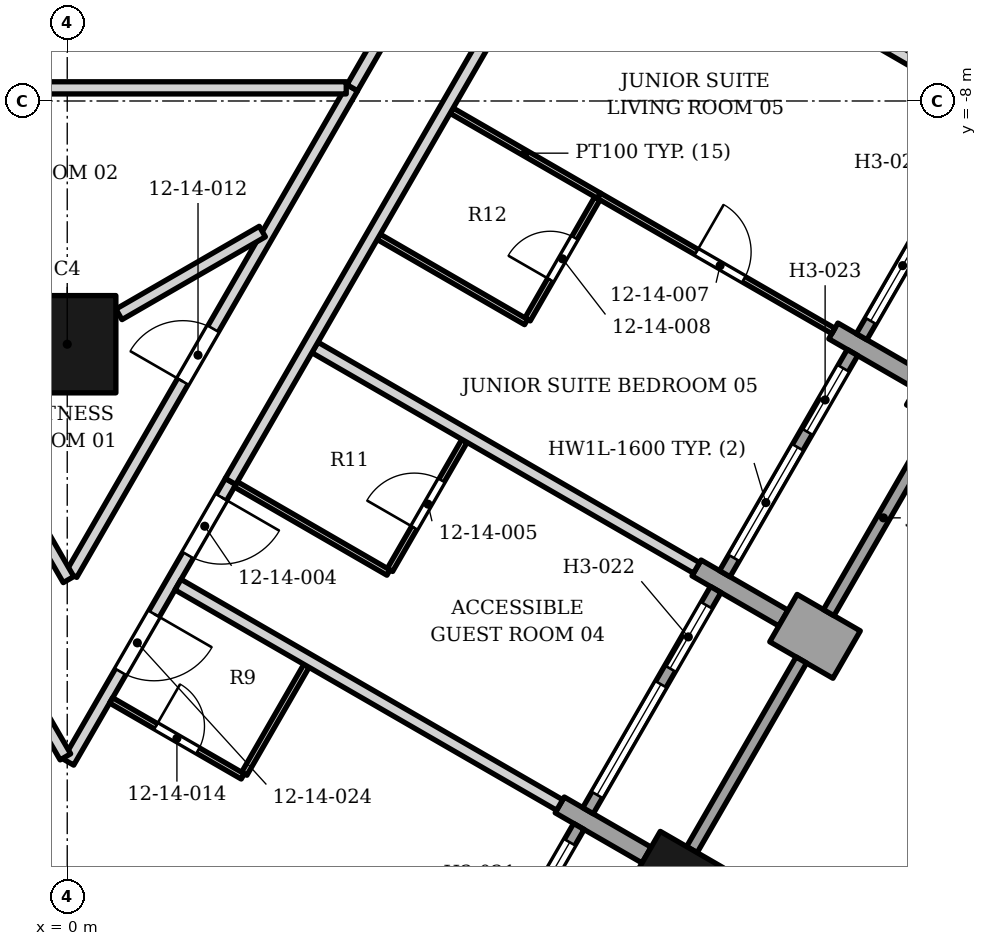
"""IFC4 building model, lengths in metres.
Left out: names, types, materials, properties, quantities, classifications, styles, units other than length and angle.
Written with IfcOpenShell. Run it as: python <this file> out.ifc"""

import sys

from ifc_helpers import new_model, si_unit, direction, frame, frame_2d, origin, origin_2d, place, context, subcontext, project, spatial, rectangle, extrude, element, fill, save


model = new_model("IFC4")
c1 = context("Model", 3, precision=1e-05, world=origin(), true_north=direction((0.0, 1.0)))
c2 = subcontext(c1, "Body", "Model", "MODEL_VIEW")
j1 = project(units=[si_unit("LENGTHUNIT", "METRE"), si_unit("PLANEANGLEUNIT", "RADIAN")], contexts=[c1])
p1 = place(None, origin())
s1 = spatial("IfcSite", under=j1, at=p1, CompositionType="ELEMENT")
p2 = place(p1, origin())
s2 = spatial("IfcBuilding", under=s1, at=p2, CompositionType="ELEMENT")
p3 = place(p2, frame((0.0, 0.0, 66.4)))
s3 = spatial("IfcBuildingStorey", under=s2, at=p3, CompositionType="ELEMENT", Elevation=66.4)
p4 = place(p3, frame((0.0, -12.0, 0.0), z_axis=(0.0, 0.0, 1.0), x_axis=(1.0, 0.0, 0.0)))
e1 = element("IfcColumn", 1, at=p4, inside=s3, PredefinedType="COLUMN", context=c2, shape_type="SweptSolid", body=[
    extrude(rectangle(XDim=1.6, YDim=1.6, at=origin_2d()), origin(), (0.0, 0.0, 1.0), 3.4),
])
for number, where, z_axis, x_axis in (
    (2, (10.048, -20.701, 0.0), (0.0, 0.0, 1.0), (0.5, 0.866, 0.0)),
    (3, (14.548, -12.907, 0.0), (0.0, 0.0, 1.0), (0.5, 0.866, 0.0)),
):
    element("IfcColumn", number, at=place(p3, frame(where, z_axis=z_axis, x_axis=x_axis)), inside=s3, PredefinedType="COLUMN", context=c2, shape_type="SweptSolid", body=[
        extrude(rectangle(XDim=0.9, YDim=1.2, at=origin_2d()), origin(), (0.0, 0.0, 1.0), 3.4),
    ])
p5 = place(p3, frame((9.529, -20.401, 0.0), z_axis=(0.0, 0.0, 1.0), x_axis=(-0.866003217194, 0.500038426333, 0.0)))
e4 = element("IfcWall", 4, at=p5, inside=s3, PredefinedType="SOLIDWALL", context=c2, shape_type="SweptSolid", body=[
    extrude(rectangle(XDim=1.65, YDim=0.3, at=frame_2d((0.825, 0.0))), origin(), (0.0, 0.0, 1.0), 2.65),
])
p6 = place(p3, frame((12.818, -17.104, 0.0), z_axis=(0.0, 0.0, 1.0), x_axis=(-0.866043267704, 0.499969057507, 0.0)))
e5 = element("IfcWall", 5, at=p6, inside=s3, PredefinedType="SOLIDWALL", context=c2, shape_type="SweptSolid", body=[
    extrude(rectangle(XDim=1.2, YDim=0.9, at=frame_2d((0.6, 0.0))), origin(), (0.0, 0.0, 1.0), 2.63),
])
p7 = place(p3, frame((11.779, -16.504, 0.0), z_axis=(0.0, 0.0, 1.0), x_axis=(-0.865976140824, 0.500085316245, 0.0)))
e6 = element("IfcWall", 6, at=p7, inside=s3, PredefinedType="SOLIDWALL", context=c2, shape_type="SweptSolid", body=[
    extrude(rectangle(XDim=1.65, YDim=0.3, at=frame_2d((0.825, 0.0))), origin(), (0.0, 0.0, 1.0), 2.65),
])
p8 = place(p3, frame((14.029, -12.607, 0.0), z_axis=(0.0, 0.0, 1.0), x_axis=(-0.866003217194, 0.500038426333, 0.0)))
e7 = element("IfcWall", 7, at=p8, inside=s3, PredefinedType="SOLIDWALL", context=c2, shape_type="SweptSolid", body=[
    extrude(rectangle(XDim=1.65, YDim=0.3, at=frame_2d((0.825, 0.0))), origin(), (0.0, 0.0, 1.0), 2.302),
])
p9 = place(p3, frame((6.314, -23.568, 0.0), z_axis=(0.0, 0.0, 1.0), x_axis=(0.500027713859, 0.866009402589, 0.0)))
e8 = element("IfcWall", 8, at=p9, inside=s3, PredefinedType="ELEMENTEDWALL", context=c2, shape_type="SweptSolid", body=[
    extrude(rectangle(XDim=4.2, YDim=0.2, at=frame_2d((2.1, 0.0))), origin(), (0.0, 0.0, 1.0), 2.65),
])
p10 = place(p9, frame((0.3, 0.0, 0.6)))
e9 = element("IfcOpeningElement", 9, at=p10, cuts=e8, PredefinedType="OPENING", context=c2, shape_type="SweptSolid", body=[
    extrude(rectangle(XDim=2.1, YDim=1.8, at=frame_2d((1.05, 0.9))), frame((0.0, 0.11, 0.0), z_axis=(0.0, -1.0, 0.0), x_axis=(1.0, 0.0, 0.0)), (0.0, 0.0, 1.0), 0.22),
])
p11 = place(p9, frame((2.7, 0.0, 0.0)))
e10 = element("IfcOpeningElement", 10, at=p11, cuts=e8, PredefinedType="OPENING", context=c2, shape_type="SweptSolid", body=[
    extrude(rectangle(XDim=1.2, YDim=2.4, at=frame_2d((0.6, 1.2))), frame((0.0, 0.11, 0.0), z_axis=(0.0, -1.0, 0.0), x_axis=(1.0, 0.0, 0.0)), (0.0, 0.0, 1.0), 0.22),
])
p12 = place(p3, frame((10.273, -20.311, 0.0), z_axis=(0.0, 0.0, 1.0), x_axis=(0.499961193289, 0.866047807691, 0.0)))
e11 = element("IfcWall", 11, at=p12, inside=s3, PredefinedType="SOLIDWALL", context=c2, shape_type="SweptSolid", body=[
    extrude(rectangle(XDim=3.6, YDim=0.2, at=frame_2d((1.8, 0.0))), origin(), (0.0, 0.0, 1.0), 2.63),
])
p13 = place(p3, frame((8.564, -19.671, 0.0), z_axis=(0.0, 0.0, 1.0), x_axis=(0.500027713859, 0.866009402589, 0.0)))
e12 = element("IfcWall", 12, at=p13, inside=s3, PredefinedType="ELEMENTEDWALL", context=c2, shape_type="SweptSolid", body=[
    extrude(rectangle(XDim=4.2, YDim=0.2, at=frame_2d((2.1, 0.0))), origin(), (0.0, 0.0, 1.0), 2.65),
])
p14 = place(p13, frame((0.3, 0.0, 0.6)))
e13 = element("IfcOpeningElement", 13, at=p14, cuts=e12, PredefinedType="OPENING", context=c2, shape_type="SweptSolid", body=[
    extrude(rectangle(XDim=2.1, YDim=1.8, at=frame_2d((1.05, 0.9))), frame((0.0, 0.11, 0.0), z_axis=(0.0, -1.0, 0.0), x_axis=(1.0, 0.0, 0.0)), (0.0, 0.0, 1.0), 0.22),
])
p15 = place(p13, frame((2.7, 0.0, 0.0)))
e14 = element("IfcOpeningElement", 14, at=p15, cuts=e12, PredefinedType="OPENING", context=c2, shape_type="SweptSolid", body=[
    extrude(rectangle(XDim=1.2, YDim=2.4, at=frame_2d((0.6, 1.2))), frame((0.0, 0.11, 0.0), z_axis=(0.0, -1.0, 0.0), x_axis=(1.0, 0.0, 0.0)), (0.0, 0.0, 1.0), 0.22),
])
p16 = place(p3, frame((12.523, -16.414, 0.0), z_axis=(0.0, 0.0, 1.0), x_axis=(0.499961193289, 0.866047807691, 0.0)))
e15 = element("IfcWall", 15, at=p16, inside=s3, PredefinedType="SOLIDWALL", context=c2, shape_type="SweptSolid", body=[
    extrude(rectangle(XDim=3.6, YDim=0.2, at=frame_2d((1.8, 0.0))), origin(), (0.0, 0.0, 1.0), 2.63),
])
p17 = place(p3, frame((10.814, -15.774, 0.0), z_axis=(0.0, 0.0, 1.0), x_axis=(0.500002543286, 0.866023935413, 0.0)))
e16 = element("IfcWall", 16, at=p17, inside=s3, PredefinedType="ELEMENTEDWALL", context=c2, shape_type="SweptSolid", body=[
    extrude(rectangle(XDim=4.2, YDim=0.2, at=frame_2d((2.1, 0.0))), origin(), (0.0, 0.0, 1.0), 2.302),
])
p18 = place(p17, frame((0.3, 0.0, 0.6)))
e17 = element("IfcOpeningElement", 17, at=p18, cuts=e16, PredefinedType="OPENING", context=c2, shape_type="SweptSolid", body=[
    extrude(rectangle(XDim=2.1, YDim=1.6, at=frame_2d((1.05, 0.8))), frame((0.0, 0.11, 0.0), z_axis=(0.0, -1.0, 0.0), x_axis=(1.0, 0.0, 0.0)), (0.0, 0.0, 1.0), 0.22),
])
p19 = place(p17, frame((2.7, 0.0, 0.0)))
e18 = element("IfcOpeningElement", 18, at=p19, cuts=e16, PredefinedType="OPENING", context=c2, shape_type="SweptSolid", body=[
    extrude(rectangle(XDim=1.2, YDim=2.2, at=frame_2d((0.6, 1.1))), frame((0.0, 0.11, 0.0), z_axis=(0.0, -1.0, 0.0), x_axis=(1.0, 0.0, 0.0)), (0.0, 0.0, 1.0), 0.22),
])
p20 = place(p3, frame((13.064, -11.877, 0.0), z_axis=(0.0, 0.0, 1.0), x_axis=(0.500027713859, 0.866009402589, 0.0)))
e19 = element("IfcWall", 19, at=p20, inside=s3, PredefinedType="ELEMENTEDWALL", context=c2, shape_type="SweptSolid", body=[
    extrude(rectangle(XDim=4.2, YDim=0.2, at=frame_2d((2.1, 0.0))), origin(), (0.0, 0.0, 1.0), 2.302),
])
p21 = place(p20, frame((0.3, 0.0, 0.6)))
e20 = element("IfcOpeningElement", 20, at=p21, cuts=e19, PredefinedType="OPENING", context=c2, shape_type="SweptSolid", body=[
    extrude(rectangle(XDim=2.1, YDim=1.6, at=frame_2d((1.05, 0.8))), frame((0.0, 0.11, 0.0), z_axis=(0.0, -1.0, 0.0), x_axis=(1.0, 0.0, 0.0)), (0.0, 0.0, 1.0), 0.22),
])
p22 = place(p20, frame((2.7, 0.0, 0.0)))
e21 = element("IfcOpeningElement", 21, at=p22, cuts=e19, PredefinedType="OPENING", context=c2, shape_type="SweptSolid", body=[
    extrude(rectangle(XDim=1.2, YDim=2.2, at=frame_2d((0.6, 1.1))), frame((0.0, 0.11, 0.0), z_axis=(0.0, -1.0, 0.0), x_axis=(1.0, 0.0, 0.0)), (0.0, 0.0, 1.0), 0.22),
])
p23 = place(p3, frame((2.911, -19.063, 0.0), z_axis=(0.0, 0.0, 1.0), x_axis=(0.499265284884, 0.866449176415, 0.0)))
e22 = element("IfcWall", 22, at=p23, inside=s3, PredefinedType="PARTITIONING", context=c2, shape_type="SweptSolid", body=[
    extrude(rectangle(XDim=2.05, YDim=0.1, at=frame_2d((1.025, 0.0))), origin(), (0.0, 0.0, 1.0), 3.23),
])
p24 = place(p3, frame((0.02, -18.872, 0.0), z_axis=(0.0, 0.0, 1.0), x_axis=(0.500389767685, 0.865800254329, 0.0)))
e23 = element("IfcWall", 23, at=p24, inside=s3, PredefinedType="PARTITIONING", context=c2, shape_type="SweptSolid", body=[
    extrude(rectangle(XDim=5.33, YDim=0.2, at=frame_2d((2.665, 0.0))), origin(), (0.0, 0.0, 1.0), 2.628),
])
p25 = place(p24, frame((3.931, 0.0, 0.0)))
e24 = element("IfcOpeningElement", 24, at=p25, cuts=e23, PredefinedType="OPENING", context=c2, shape_type="SweptSolid", body=[
    extrude(rectangle(XDim=1.1, YDim=2.1, at=frame_2d((0.55, 1.05))), frame((0.0, 0.11, 0.0), z_axis=(0.0, -1.0, 0.0), x_axis=(1.0, 0.0, 0.0)), (0.0, 0.0, 1.0), 0.22),
])
p26 = place(p24, frame((1.715, 0.0, 0.0)))
e25 = element("IfcOpeningElement", 25, at=p26, cuts=e23, PredefinedType="OPENING", context=c2, shape_type="SweptSolid", body=[
    extrude(rectangle(XDim=1.1, YDim=2.1, at=frame_2d((0.55, 1.05))), frame((0.0, 0.11, 0.0), z_axis=(0.0, -1.0, 0.0), x_axis=(1.0, 0.0, 0.0)), (0.0, 0.0, 1.0), 0.22),
])
p27 = place(p3, frame((0.721, -17.857, 0.0), z_axis=(0.0, 0.0, 1.0), x_axis=(0.866022959057, -0.500004234368, 0.0)))
e26 = element("IfcWall", 26, at=p27, inside=s3, PredefinedType="PARTITIONING", context=c2, shape_type="SweptSolid", body=[
    extrude(rectangle(XDim=2.5, YDim=0.1, at=frame_2d((1.25, 0.0))), origin(), (0.0, 0.0, 1.0), 3.23),
])
p28 = place(p27, frame((0.85, 0.0, 0.0)))
e27 = element("IfcOpeningElement", 27, at=p28, cuts=e26, PredefinedType="OPENING", context=c2, shape_type="SweptSolid", body=[
    extrude(rectangle(XDim=0.8, YDim=2.1, at=frame_2d((0.4, 1.05))), frame((0.0, 0.06, 0.0), z_axis=(0.0, -1.0, 0.0), x_axis=(1.0, 0.0, 0.0)), (0.0, 0.0, 1.0), 0.12),
])
p29 = place(p3, frame((-0.743, -17.555, 0.0), z_axis=(0.0, 0.0, 1.0), x_axis=(0.501049807784, -0.865418447989, 0.0)))
e28 = element("IfcWall", 28, at=p29, inside=s3, PredefinedType="PARTITIONING", context=c2, shape_type="SweptSolid", body=[
    extrude(rectangle(XDim=1.422, YDim=0.2, at=frame_2d((0.711, 0.0))), origin(), (0.0, 0.0, 1.0), 2.628),
])
p30 = place(p3, frame((1.822, -15.954, 0.0), z_axis=(0.0, 0.0, 1.0), x_axis=(0.866029090493, -0.499993614378, 0.0)))
e29 = element("IfcWall", 29, at=p30, inside=s3, PredefinedType="PARTITIONING", context=c2, shape_type="SweptSolid", body=[
    extrude(rectangle(XDim=7.248, YDim=0.2, at=frame_2d((3.624, 0.0))), origin(), (0.0, 0.0, 1.0), 2.552),
])
p31 = place(p3, frame((0.069, -15.785, 0.0), z_axis=(0.0, 0.0, 1.0), x_axis=(0.499998459685, 0.866026293084, 0.0)))
e30 = element("IfcWall", 30, at=p31, inside=s3, PredefinedType="PARTITIONING", context=c2, shape_type="SweptSolid", body=[
    extrude(rectangle(XDim=9.239, YDim=0.2, at=frame_2d((4.62, 0.0))), origin(), (0.0, 0.0, 1.0), 2.302),
])
p32 = place(p31, frame((3.663, 0.0, 0.0)))
e31 = element("IfcOpeningElement", 31, at=p32, cuts=e30, PredefinedType="OPENING", context=c2, shape_type="SweptSolid", body=[
    extrude(rectangle(XDim=1.0, YDim=2.1, at=frame_2d((0.5, 1.05))), frame((0.0, 0.11, 0.0), z_axis=(0.0, -1.0, 0.0), x_axis=(1.0, 0.0, 0.0)), (0.0, 0.0, 1.0), 0.22),
])
p33 = place(p3, frame((5.308, -15.712, 0.0), z_axis=(0.0, 0.0, 1.0), x_axis=(0.500018594424, 0.866014668023, 0.0)))
e32 = element("IfcWall", 32, at=p33, inside=s3, PredefinedType="PARTITIONING", context=c2, shape_type="SweptSolid", body=[
    extrude(rectangle(XDim=2.45, YDim=0.1, at=frame_2d((1.225, 0.0))), origin(), (0.0, 0.0, 1.0), 3.23),
])
p34 = place(p33, frame((0.8, 0.0, 0.0)))
e33 = element("IfcOpeningElement", 33, at=p34, cuts=e32, PredefinedType="OPENING", context=c2, shape_type="SweptSolid", body=[
    extrude(rectangle(XDim=0.9, YDim=2.1, at=frame_2d((0.45, 1.05))), frame((0.0, 0.06, 0.0), z_axis=(0.0, -1.0, 0.0), x_axis=(1.0, 0.0, 0.0)), (0.0, 0.0, 1.0), 0.12),
])
p35 = place(p3, frame((2.772, -14.304, 0.0), z_axis=(0.0, 0.0, 1.0), x_axis=(0.865729701078, -0.500511822708, 0.0)))
e34 = element("IfcWall", 34, at=p35, inside=s3, PredefinedType="PARTITIONING", context=c2, shape_type="SweptSolid", body=[
    extrude(rectangle(XDim=2.9, YDim=0.1, at=frame_2d((1.45, 0.0))), origin(), (0.0, 0.0, 1.0), 2.552),
])
p36 = place(p3, frame((4.072, -12.052, 0.0), z_axis=(0.0, 0.0, 1.0), x_axis=(0.865900080757, -0.500217003055, 0.0)))
e35 = element("IfcWall", 35, at=p36, inside=s3, PredefinedType="PARTITIONING", context=c2, shape_type="SweptSolid", body=[
    extrude(rectangle(XDim=7.25, YDim=0.2, at=frame_2d((3.625, 0.0))), origin(), (0.0, 0.0, 1.0), 2.302),
])
p37 = place(p3, frame((8.745, -9.559, 0.0), z_axis=(0.0, 0.0, 1.0), x_axis=(0.866220293694, -0.499662288743, 0.0)))
e36 = element("IfcWall", 36, at=p37, inside=s3, PredefinedType="PARTITIONING", context=c2, shape_type="SweptSolid", body=[
    extrude(rectangle(XDim=4.45, YDim=0.1, at=frame_2d((2.225, 0.0))), origin(), (0.0, 0.0, 1.0), 2.552),
])
p38 = place(p37, frame((1.85, 0.0, 0.0)))
e37 = element("IfcOpeningElement", 37, at=p38, cuts=e36, PredefinedType="OPENING", context=c2, shape_type="SweptSolid", body=[
    extrude(rectangle(XDim=0.9, YDim=2.1, at=frame_2d((0.45, 1.05))), frame((0.0, 0.06, 0.0), z_axis=(0.0, -1.0, 0.0), x_axis=(1.0, 0.0, 0.0)), (0.0, 0.0, 1.0), 0.12),
])
p39 = place(p3, frame((7.571, -11.592, 0.0), z_axis=(0.0, 0.0, 1.0), x_axis=(0.499418922955, 0.86636062895, 0.0)))
e38 = element("IfcWall", 38, at=p39, inside=s3, PredefinedType="PARTITIONING", context=c2, shape_type="SweptSolid", body=[
    extrude(rectangle(XDim=2.298, YDim=0.1, at=frame_2d((1.149, 0.0))), origin(), (0.0, 0.0, 1.0), 3.23),
])
p40 = place(p39, frame((0.75, 0.0, 0.0)))
e39 = element("IfcOpeningElement", 39, at=p40, cuts=e38, PredefinedType="OPENING", context=c2, shape_type="SweptSolid", body=[
    extrude(rectangle(XDim=0.8, YDim=2.1, at=frame_2d((0.4, 1.05))), frame((0.0, 0.06, 0.0), z_axis=(0.0, -1.0, 0.0), x_axis=(1.0, 0.0, 0.0)), (0.0, 0.0, 1.0), 0.12),
])
p41 = place(p3, frame((0.85, -11.509, 0.0), z_axis=(0.0, 0.0, 1.0), x_axis=(0.865994487098, 0.500053545449, 0.0)))
e40 = element("IfcWall", 40, at=p41, inside=s3, PredefinedType="PARTITIONING", context=c2, shape_type="SweptSolid", body=[
    extrude(rectangle(XDim=2.723, YDim=0.2, at=frame_2d((1.362, 0.0))), origin(), (0.0, 0.0, 1.0), 3.23),
])
p42 = place(p3, frame((5.122, -10.234, 0.0), z_axis=(0.0, 0.0, 1.0), x_axis=(0.86575844616, -0.500462099367, 0.0)))
e41 = element("IfcWall", 41, at=p42, inside=s3, PredefinedType="PARTITIONING", context=c2, shape_type="SweptSolid", body=[
    extrude(rectangle(XDim=2.8, YDim=0.1, at=frame_2d((1.4, 0.0))), origin(), (0.0, 0.0, 1.0), 3.23),
])
p43 = place(p3, frame((6.32, -8.158, 0.0), z_axis=(0.0, 0.0, 1.0), x_axis=(0.865995230276, -0.500052258409, 0.0)))
e42 = element("IfcWall", 42, at=p43, inside=s3, PredefinedType="PARTITIONING", context=c2, shape_type="SweptSolid", body=[
    extrude(rectangle(XDim=2.798, YDim=0.1, at=frame_2d((1.399, 0.0))), origin(), (0.0, 0.0, 1.0), 3.23),
])
p44 = place(p3, frame((-4.649, -7.782, 0.0), z_axis=(0.0, 0.0, 1.0), x_axis=(0.500018878653, -0.866014503915, 0.0)))
e43 = element("IfcWall", 43, at=p44, inside=s3, PredefinedType="PARTITIONING", context=c2, shape_type="SweptSolid", body=[
    extrude(rectangle(XDim=9.34, YDim=0.2, at=frame_2d((4.67, 0.0))), origin(), (0.0, 0.0, 1.0), 2.374),
])
p45 = place(p44, frame((2.488, 0.0, 0.0)))
e44 = element("IfcOpeningElement", 44, at=p45, cuts=e43, PredefinedType="OPENING", context=c2, shape_type="SweptSolid", body=[
    extrude(rectangle(XDim=1.0, YDim=2.1, at=frame_2d((0.5, 1.05))), frame((0.0, 0.11, 0.0), z_axis=(0.0, -1.0, 0.0), x_axis=(1.0, 0.0, 0.0)), (0.0, 0.0, 1.0), 0.22),
])
p46 = place(p3, frame((-4.55, -7.784, 0.0), z_axis=(0.0, 0.0, 1.0), x_axis=(1.0, 0.0, 0.0)))
e45 = element("IfcWall", 45, at=p46, inside=s3, PredefinedType="PARTITIONING", context=c2, shape_type="SweptSolid", body=[
    extrude(rectangle(XDim=9.138, YDim=0.2, at=frame_2d((4.569, 0.0))), origin(), (0.0, 0.0, 1.0), 2.384),
])
p47 = place(p3, frame((4.688, -7.782, 0.0), z_axis=(0.0, 0.0, 1.0), x_axis=(0.499996438971, 0.866027459735, 0.0)))
e46 = element("IfcWall", 46, at=p47, inside=s3, PredefinedType="PARTITIONING", context=c2, shape_type="SweptSolid", body=[
    extrude(rectangle(XDim=8.073, YDim=0.2, at=frame_2d((4.037, 0.0))), origin(), (0.0, 0.0, 1.0), 2.384),
])
p48 = place(p3, frame((8.572, -4.258, 0.0), z_axis=(0.0, 0.0, 1.0), x_axis=(0.865900080757, -0.500217003055, 0.0)))
e47 = element("IfcWall", 47, at=p48, inside=s3, PredefinedType="PARTITIONING", context=c2, shape_type="SweptSolid", body=[
    extrude(rectangle(XDim=7.25, YDim=0.2, at=frame_2d((3.625, 0.0))), origin(), (0.0, 0.0, 1.0), 2.384),
])
p49 = place(p3, frame((2.686, -14.257, 0.0), z_axis=(0.0, 0.0, 1.0), x_axis=(0.49998850195, 0.866032042085, 0.0)))
e48 = element("IfcWall", 48, at=p49, inside=s3, PredefinedType="PARTITIONING", context=c2, shape_type="SweptSolid", body=[
    extrude(rectangle(XDim=20.6, YDim=0.2, at=frame_2d((10.3, 0.0))), origin(), (0.0, 0.0, 1.0), 2.302),
])
p50 = place(p49, frame((9.7, 0.0, 0.0)))
e49 = element("IfcOpeningElement", 49, at=p50, cuts=e48, PredefinedType="OPENING", context=c2, shape_type="SweptSolid", body=[
    extrude(rectangle(XDim=1.1, YDim=2.1, at=frame_2d((0.55, 1.05))), frame((0.0, 0.11, 0.0), z_axis=(0.0, -1.0, 0.0), x_axis=(1.0, 0.0, 0.0)), (0.0, 0.0, 1.0), 0.22),
])
p51 = place(p49, frame((15.6, 0.0, 0.0)))
e50 = element("IfcOpeningElement", 50, at=p51, cuts=e48, PredefinedType="OPENING", context=c2, shape_type="SweptSolid", body=[
    extrude(rectangle(XDim=1.0, YDim=2.1, at=frame_2d((0.5, 1.05))), frame((0.0, 0.11, 0.0), z_axis=(0.0, -1.0, 0.0), x_axis=(1.0, 0.0, 0.0)), (0.0, 0.0, 1.0), 0.22),
])
p52 = place(p11, origin())
e51 = element("IfcDoor", 51, at=p52, inside=s3, OperationType="SINGLE_SWING_LEFT", PredefinedType="DOOR", context=c2, shape_type="SweptSolid", body=[
    extrude(rectangle(XDim=1.2, YDim=2.4, at=frame_2d((0.6, 1.2))), frame((0.0, 0.025, 0.0), z_axis=(0.0, -1.0, 0.0), x_axis=(1.0, 0.0, 0.0)), (0.0, 0.0, 1.0), 0.05),
])
fill(e10, e51)
p53 = place(p14, origin())
e52 = element("IfcWindow", 52, at=p53, inside=s3, PartitioningType="SINGLE_PANEL", PredefinedType="WINDOW", context=c2, shape_type="SweptSolid", body=[
    extrude(rectangle(XDim=2.1, YDim=1.8, at=frame_2d((1.05, 0.9))), frame((0.0, 0.03, 0.0), z_axis=(0.0, -1.0, 0.0), x_axis=(1.0, 0.0, 0.0)), (0.0, 0.0, 1.0), 0.06),
])
fill(e13, e52)
p54 = place(p15, origin())
e53 = element("IfcDoor", 53, at=p54, inside=s3, OperationType="SINGLE_SWING_LEFT", PredefinedType="DOOR", context=c2, shape_type="SweptSolid", body=[
    extrude(rectangle(XDim=1.2, YDim=2.4, at=frame_2d((0.6, 1.2))), frame((0.0, 0.025, 0.0), z_axis=(0.0, -1.0, 0.0), x_axis=(1.0, 0.0, 0.0)), (0.0, 0.0, 1.0), 0.05),
])
fill(e14, e53)
p55 = place(p18, origin())
e54 = element("IfcWindow", 54, at=p55, inside=s3, PartitioningType="SINGLE_PANEL", PredefinedType="WINDOW", context=c2, shape_type="SweptSolid", body=[
    extrude(rectangle(XDim=2.1, YDim=1.6, at=frame_2d((1.05, 0.8))), frame((0.0, 0.03, 0.0), z_axis=(0.0, -1.0, 0.0), x_axis=(1.0, 0.0, 0.0)), (0.0, 0.0, 1.0), 0.06),
])
fill(e17, e54)
p56 = place(p19, origin())
e55 = element("IfcDoor", 55, at=p56, inside=s3, OperationType="SINGLE_SWING_LEFT", PredefinedType="DOOR", context=c2, shape_type="SweptSolid", body=[
    extrude(rectangle(XDim=1.2, YDim=2.2, at=frame_2d((0.6, 1.1))), frame((0.0, 0.025, 0.0), z_axis=(0.0, -1.0, 0.0), x_axis=(1.0, 0.0, 0.0)), (0.0, 0.0, 1.0), 0.05),
])
fill(e18, e55)
p57 = place(p21, origin())
e56 = element("IfcWindow", 56, at=p57, inside=s3, PartitioningType="SINGLE_PANEL", PredefinedType="WINDOW", context=c2, shape_type="SweptSolid", body=[
    extrude(rectangle(XDim=2.1, YDim=1.6, at=frame_2d((1.05, 0.8))), frame((0.0, 0.03, 0.0), z_axis=(0.0, -1.0, 0.0), x_axis=(1.0, 0.0, 0.0)), (0.0, 0.0, 1.0), 0.06),
])
fill(e20, e56)
p58 = place(p25, origin())
e57 = element("IfcDoor", 57, at=p58, inside=s3, OperationType="SINGLE_SWING_RIGHT", PredefinedType="DOOR", context=c2, shape_type="SweptSolid", body=[
    extrude(rectangle(XDim=1.1, YDim=2.1, at=frame_2d((0.55, 1.05))), frame((0.0, 0.025, 0.0), z_axis=(0.0, -1.0, 0.0), x_axis=(1.0, 0.0, 0.0)), (0.0, 0.0, 1.0), 0.05),
])
fill(e24, e57)
p59 = place(p34, origin())
e58 = element("IfcDoor", 58, at=p59, inside=s3, OperationType="SINGLE_SWING_LEFT", PredefinedType="DOOR", context=c2, shape_type="SweptSolid", body=[
    extrude(rectangle(XDim=0.9, YDim=2.1, at=frame_2d((0.45, 1.05))), frame((0.0, 0.025, 0.0), z_axis=(0.0, -1.0, 0.0), x_axis=(1.0, 0.0, 0.0)), (0.0, 0.0, 1.0), 0.05),
])
fill(e33, e58)
p60 = place(p38, origin())
e59 = element("IfcDoor", 59, at=p60, inside=s3, OperationType="SINGLE_SWING_LEFT", PredefinedType="DOOR", context=c2, shape_type="SweptSolid", body=[
    extrude(rectangle(XDim=0.9, YDim=2.1, at=frame_2d((0.45, 1.05))), frame((0.0, 0.025, 0.0), z_axis=(0.0, -1.0, 0.0), x_axis=(1.0, 0.0, 0.0)), (0.0, 0.0, 1.0), 0.05),
])
fill(e37, e59)
p61 = place(p40, origin())
e60 = element("IfcDoor", 60, at=p61, inside=s3, OperationType="SINGLE_SWING_LEFT", PredefinedType="DOOR", context=c2, shape_type="SweptSolid", body=[
    extrude(rectangle(XDim=0.8, YDim=2.1, at=frame_2d((0.4, 1.05))), frame((0.0, 0.025, 0.0), z_axis=(0.0, -1.0, 0.0), x_axis=(1.0, 0.0, 0.0)), (0.0, 0.0, 1.0), 0.05),
])
fill(e39, e60)
p62 = place(p32, origin())
e61 = element("IfcDoor", 61, at=p62, inside=s3, OperationType="SINGLE_SWING_LEFT", PredefinedType="DOOR", context=c2, shape_type="SweptSolid", body=[
    extrude(rectangle(XDim=1.0, YDim=2.1, at=frame_2d((0.5, 1.05))), frame((0.0, 0.025, 0.0), z_axis=(0.0, -1.0, 0.0), x_axis=(1.0, 0.0, 0.0)), (0.0, 0.0, 1.0), 0.05),
])
fill(e31, e61)
p63 = place(p28, origin())
e62 = element("IfcDoor", 62, at=p63, inside=s3, OperationType="SINGLE_SWING_LEFT", PredefinedType="DOOR", context=c2, shape_type="SweptSolid", body=[
    extrude(rectangle(XDim=0.8, YDim=2.1, at=frame_2d((0.4, 1.05))), frame((0.0, 0.025, 0.0), z_axis=(0.0, -1.0, 0.0), x_axis=(1.0, 0.0, 0.0)), (0.0, 0.0, 1.0), 0.05),
])
fill(e27, e62)
p64 = place(p26, origin())
e63 = element("IfcDoor", 63, at=p64, inside=s3, OperationType="SINGLE_SWING_RIGHT", PredefinedType="DOOR", context=c2, shape_type="SweptSolid", body=[
    extrude(rectangle(XDim=1.1, YDim=2.1, at=frame_2d((0.55, 1.05))), frame((0.0, 0.025, 0.0), z_axis=(0.0, -1.0, 0.0), x_axis=(1.0, 0.0, 0.0)), (0.0, 0.0, 1.0), 0.05),
])
fill(e25, e63)
save(model, sys.argv[1])
